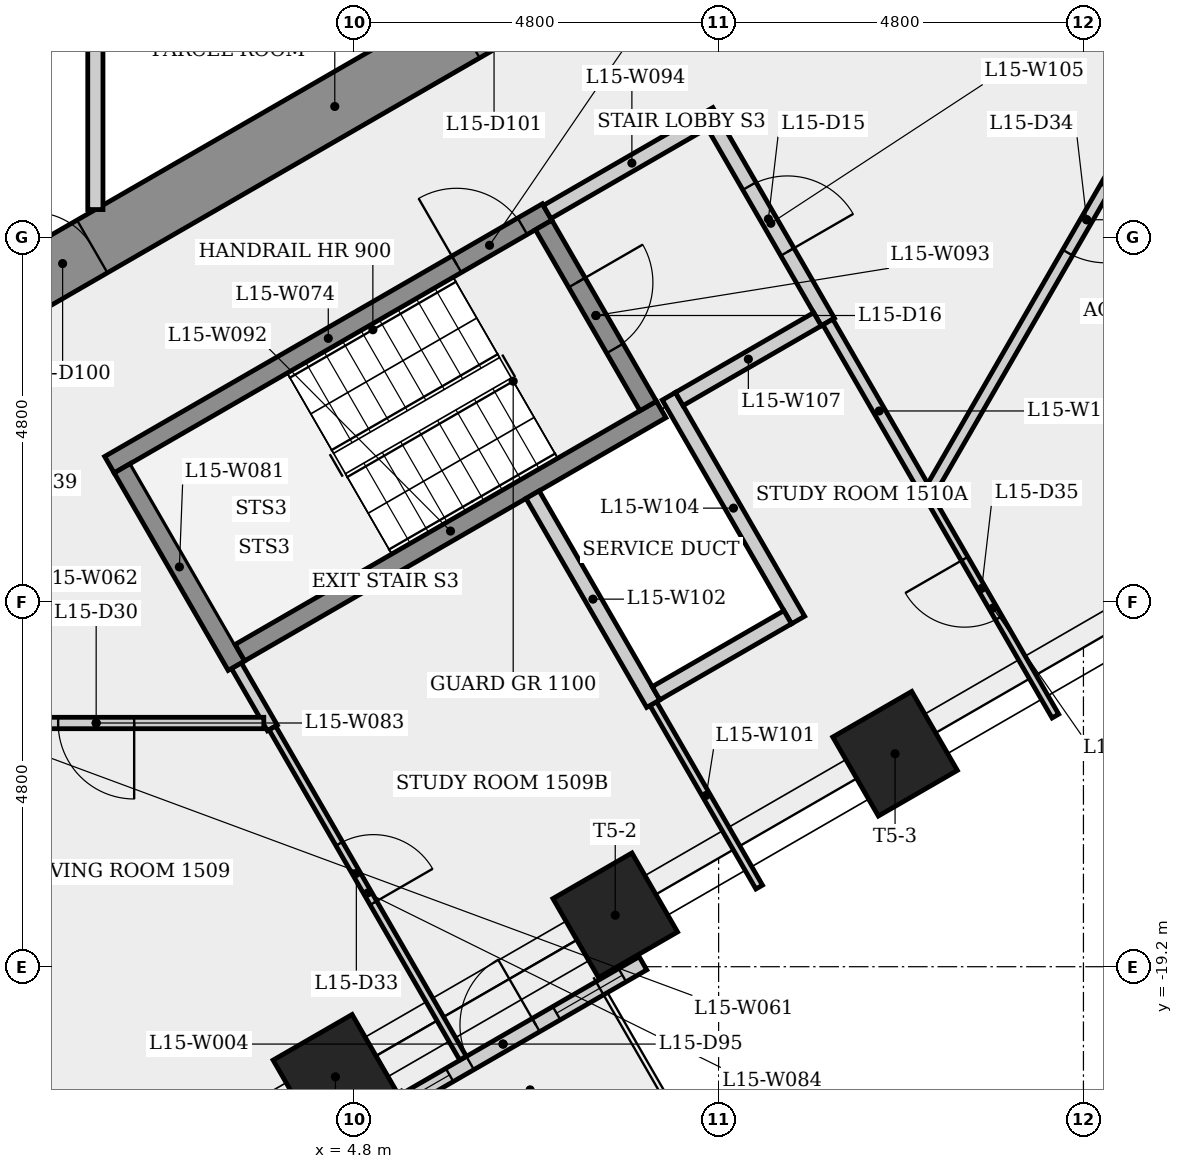
"""IFC4 building model, lengths in metres.
Left out: names, types, materials, properties, quantities, classifications, styles, units other than length and angle.
Written with IfcOpenShell. Run it as: python <this file> out.ifc"""

import sys

from ifc_helpers import new_model, si_unit, direction, frame, frame_2d, origin, origin_2d, place, context, subcontext, project, spatial, rectangle, extrude, element, fill, save


model = new_model("IFC4")
c1 = context("Model", 3, precision=1e-05, world=origin(), true_north=direction((0.0, 1.0)))
c2 = subcontext(c1, "Body", "Model", "MODEL_VIEW")
j1 = project(units=[si_unit("LENGTHUNIT", "METRE"), si_unit("PLANEANGLEUNIT", "RADIAN")], contexts=[c1])
p1 = place(None, origin())
s1 = spatial("IfcSite", under=j1, at=p1, CompositionType="ELEMENT")
p2 = place(p1, origin())
s2 = spatial("IfcBuilding", under=s1, at=p2, CompositionType="ELEMENT")
p3 = place(p2, frame((0.0, 0.0, 59.5)))
s3 = spatial("IfcBuildingStorey", under=s2, at=p3, CompositionType="ELEMENT", Elevation=59.5)
p4 = place(p3, frame((-0.2, -10.623, 0.0), z_axis=(0.0, 0.0, 1.0), x_axis=(0.866023993627, 0.500002442456, 0.0)))
e1 = element("IfcWall", 1, at=p4, inside=s3, PredefinedType="SHEAR", context=c2, shape_type="SweptSolid", body=[
    extrude(rectangle(XDim=10.97, YDim=0.8, at=frame_2d((5.485, 0.0))), origin(), (0.0, 0.0, 1.0), 3.4),
])
p5 = place(p4, frame((0.9, 0.0, 0.0)))
e2 = element("IfcOpeningElement", 2, at=p5, cuts=e1, PredefinedType="OPENING", context=c2, shape_type="SweptSolid", body=[
    extrude(rectangle(XDim=0.9, YDim=2.1, at=frame_2d((0.45, 1.05))), frame((0.0, 0.41, 0.0), z_axis=(0.0, -1.0, 0.0), x_axis=(1.0, 0.0, 0.0)), (0.0, 0.0, 1.0), 0.82),
])
p6 = place(p4, frame((7.455, 0.0, 0.0)))
e3 = element("IfcOpeningElement", 3, at=p6, cuts=e1, PredefinedType="OPENING", context=c2, shape_type="SweptSolid", body=[
    extrude(rectangle(XDim=0.9, YDim=2.1, at=frame_2d((0.45, 1.05))), frame((0.0, 0.41, 0.0), z_axis=(0.0, -1.0, 0.0), x_axis=(1.0, 0.0, 0.0)), (0.0, 0.0, 1.0), 0.82),
])
for number, where, z_axis, x_axis in (
    (4, (4.558, -20.649, 0.0), (0.0, 0.0, 1.0), (0.5, -0.866, 0.0)),
    (5, (8.24, -18.523, 0.0), (0.0, 0.0, 1.0), (0.5, -0.866, 0.0)),
    (6, (11.921, -16.397, 0.0), (0.0, 0.0, 1.0), (0.5, -0.866, 0.0)),
):
    element("IfcColumn", number, at=place(p3, frame(where, z_axis=z_axis, x_axis=x_axis)), inside=s3, PredefinedType="COLUMN", context=c2, shape_type="SweptSolid", body=[
        extrude(rectangle(XDim=1.2, YDim=1.2, at=origin_2d()), origin(), (0.0, 0.0, 1.0), 3.4),
    ])
p7 = place(p3, frame((4.923, -21.281, 0.0), z_axis=(0.0, 0.0, 1.0), x_axis=(0.866036396571, 0.499980959452, 0.0)))
e7 = element("IfcWall", 7, at=p7, inside=s3, PredefinedType="SOLIDWALL", context=c2, shape_type="SweptSolid", body=[
    extrude(rectangle(XDim=4.251, YDim=0.2, at=frame_2d((2.125, 0.0))), origin(), (0.0, 0.0, 1.0), 3.4),
])
p8 = place(p7, frame((1.625, 0.0, 0.0)))
e8 = element("IfcOpeningElement", 8, at=p8, cuts=e7, PredefinedType="OPENING", context=c2, shape_type="SweptSolid", body=[
    extrude(rectangle(XDim=1.0, YDim=2.4, at=frame_2d((0.5, 1.2))), frame((0.0, 0.11, 0.0), z_axis=(0.0, -1.0, 0.0), x_axis=(1.0, 0.0, 0.0)), (0.0, 0.0, 1.0), 0.22),
])
p9 = place(p7, frame((0.313, 0.0, 0.9)))
e9 = element("IfcOpeningElement", 9, at=p9, cuts=e7, PredefinedType="OPENING", context=c2, shape_type="SweptSolid", body=[
    extrude(rectangle(XDim=1.0, YDim=1.5, at=frame_2d((0.5, 0.75))), frame((0.0, 0.11, 0.0), z_axis=(0.0, -1.0, 0.0), x_axis=(1.0, 0.0, 0.0)), (0.0, 0.0, 1.0), 0.22),
])
p10 = place(p7, frame((2.938, 0.0, 0.9)))
e10 = element("IfcOpeningElement", 10, at=p10, cuts=e7, PredefinedType="OPENING", context=c2, shape_type="SweptSolid", body=[
    extrude(rectangle(XDim=1.0, YDim=1.5, at=frame_2d((0.5, 0.75))), frame((0.0, 0.11, 0.0), z_axis=(0.0, -1.0, 0.0), x_axis=(1.0, 0.0, 0.0)), (0.0, 0.0, 1.0), 0.22),
])
p11 = place(p3, frame((1.4, -5.275, 0.0), z_axis=(0.0, 0.0, 1.0), x_axis=(0.0, -1.0, 0.0)))
e11 = element("IfcWall", 11, at=p11, inside=s3, PredefinedType="PARTITIONING", context=c2, shape_type="SweptSolid", body=[
    extrude(rectangle(XDim=3.963, YDim=0.2, at=frame_2d((1.981, 0.0))), origin(), (0.0, 0.0, 1.0), 3.05),
])
p12 = place(p3, frame((1.585, -12.595, 0.0), z_axis=(0.0, 0.0, 1.0), x_axis=(0.866036417653, 0.499980922934, 0.0)))
e12 = element("IfcWall", 12, at=p12, inside=s3, PredefinedType="SHEAR", context=c2, shape_type="SweptSolid", body=[
    extrude(rectangle(XDim=6.65, YDim=0.25, at=frame_2d((3.325, 0.0))), origin(), (0.0, 0.0, 1.0), 3.05),
])
p13 = place(p12, frame((5.275, 0.0, 0.0)))
e13 = element("IfcOpeningElement", 13, at=p13, cuts=e12, PredefinedType="OPENING", context=c2, shape_type="SweptSolid", body=[
    extrude(rectangle(XDim=1.0, YDim=2.1, at=frame_2d((0.5, 1.05))), frame((0.0, 0.135, 0.0), z_axis=(0.0, -1.0, 0.0), x_axis=(1.0, 0.0, 0.0)), (0.0, 0.0, 1.0), 0.27),
])
p14 = place(p3, frame((3.256, -15.239, 0.0), z_axis=(0.0, 0.0, 1.0), x_axis=(0.499886281871, -0.866091049023, 0.0)))
e14 = element("IfcWall", 14, at=p14, inside=s3, PredefinedType="PARTITIONING", context=c2, shape_type="SweptSolid", body=[
    extrude(rectangle(XDim=0.946, YDim=0.15, at=frame_2d((0.473, 0.0))), origin(), (0.0, 0.0, 1.0), 3.05),
])
p15 = place(p3, frame((3.256, -15.239, 0.0), z_axis=(0.0, 0.0, 1.0), x_axis=(-0.50002537861, 0.866010750942, 0.0)))
e15 = element("IfcWall", 15, at=p15, inside=s3, PredefinedType="SHEAR", context=c2, shape_type="SweptSolid", body=[
    extrude(rectangle(XDim=3.0, YDim=0.25, at=frame_2d((1.5, 0.0))), origin(), (0.0, 0.0, 1.0), 3.05),
])
p16 = place(p3, frame((3.616, -15.993, 0.0), z_axis=(0.0, 0.0, 1.0), x_axis=(-1.0, 0.0, 0.0)))
e16 = element("IfcWall", 16, at=p16, inside=s3, PredefinedType="PARTITIONING", context=c2, shape_type="SweptSolid", body=[
    extrude(rectangle(XDim=4.411, YDim=0.15, at=frame_2d((2.206, 0.0))), origin(), (0.0, 0.0, 1.0), 3.05),
])
p17 = place(p16, frame((1.706, 0.0, 0.0)))
e17 = element("IfcOpeningElement", 17, at=p17, cuts=e16, PredefinedType="OPENING", context=c2, shape_type="SweptSolid", body=[
    extrude(rectangle(XDim=1.0, YDim=2.1, at=frame_2d((0.5, 1.05))), frame((0.0, 0.085, 0.0), z_axis=(0.0, -1.0, 0.0), x_axis=(1.0, 0.0, 0.0)), (0.0, 0.0, 1.0), 0.17),
])
p18 = place(p3, frame((3.729, -16.058, 0.0), z_axis=(0.0, 0.0, 1.0), x_axis=(0.50000754391, -0.866021048262, 0.0)))
e18 = element("IfcWall", 18, at=p18, inside=s3, PredefinedType="PARTITIONING", context=c2, shape_type="SweptSolid", body=[
    extrude(rectangle(XDim=5.016, YDim=0.1, at=frame_2d((2.508, 0.0))), origin(), (0.0, 0.0, 1.0), 3.05),
])
p19 = place(p18, frame((1.76, 0.0, 0.0)))
e19 = element("IfcOpeningElement", 19, at=p19, cuts=e18, PredefinedType="OPENING", context=c2, shape_type="SweptSolid", body=[
    extrude(rectangle(XDim=0.9, YDim=2.1, at=frame_2d((0.45, 1.05))), frame((0.0, 0.06, 0.0), z_axis=(0.0, -1.0, 0.0), x_axis=(1.0, 0.0, 0.0)), (0.0, 0.0, 1.0), 0.12),
])
p20 = place(p3, frame((3.301, -15.068, 0.0), z_axis=(0.0, 0.0, 1.0), x_axis=(0.866035036182, 0.499983315828, 0.0)))
e20 = element("IfcWall", 20, at=p20, inside=s3, PredefinedType="SHEAR", context=c2, shape_type="SweptSolid", body=[
    extrude(rectangle(XDim=6.4, YDim=0.25, at=frame_2d((3.2, 0.0))), origin(), (0.0, 0.0, 1.0), 3.05),
])
p21 = place(p3, frame((7.298, -9.441, 0.0), z_axis=(0.0, 0.0, 1.0), x_axis=(0.500034990121, -0.866005201286, 0.0)))
e21 = element("IfcWall", 21, at=p21, inside=s3, PredefinedType="SHEAR", context=c2, shape_type="SweptSolid", body=[
    extrude(rectangle(XDim=2.75, YDim=0.25, at=frame_2d((1.375, 0.0))), origin(), (0.0, 0.0, 1.0), 3.05),
])
p22 = place(p21, frame((0.875, 0.0, 0.0)))
e22 = element("IfcOpeningElement", 22, at=p22, cuts=e21, PredefinedType="OPENING", context=c2, shape_type="SweptSolid", body=[
    extrude(rectangle(XDim=1.0, YDim=2.1, at=frame_2d((0.5, 1.05))), frame((0.0, 0.135, 0.0), z_axis=(0.0, -1.0, 0.0), x_axis=(1.0, 0.0, 0.0)), (0.0, 0.0, 1.0), 0.27),
])
p23 = place(p3, frame((7.344, -9.27, 0.0), z_axis=(0.0, 0.0, 1.0), x_axis=(0.866005588531, 0.500034319456, 0.0)))
e23 = element("IfcWall", 23, at=p23, inside=s3, PredefinedType="PARTITIONING", context=c2, shape_type="SweptSolid", body=[
    extrude(rectangle(XDim=2.575, YDim=0.2, at=frame_2d((1.288, 0.0))), origin(), (0.0, 0.0, 1.0), 3.05),
])
p24 = place(p3, frame((8.74, -15.738, 0.0), z_axis=(0.0, 0.0, 1.0), x_axis=(0.500048472683, -0.865997416259, 0.0)))
e24 = element("IfcWall", 24, at=p24, inside=s3, PredefinedType="PARTITIONING", context=c2, shape_type="SweptSolid", body=[
    extrude(rectangle(XDim=2.787, YDim=0.1, at=frame_2d((1.394, 0.0))), origin(), (0.0, 0.0, 1.0), 3.05),
])
p25 = place(p3, frame((8.74, -15.739, 0.0), z_axis=(0.0, 0.0, 1.0), x_axis=(-0.500017526161, 0.866015284814, 0.0)))
e25 = element("IfcWall", 25, at=p25, inside=s3, PredefinedType="PLUMBINGWALL", context=c2, shape_type="SweptSolid", body=[
    extrude(rectangle(XDim=3.175, YDim=0.2, at=frame_2d((1.588, 0.0))), origin(), (0.0, 0.0, 1.0), 3.05),
])
p26 = place(p3, frame((8.945, -11.694, 0.0), z_axis=(0.0, 0.0, 1.0), x_axis=(0.500062241894, -0.865989465428, 0.0)))
e26 = element("IfcWall", 26, at=p26, inside=s3, PredefinedType="PLUMBINGWALL", context=c2, shape_type="SweptSolid", body=[
    extrude(rectangle(XDim=3.4, YDim=0.2, at=frame_2d((1.7, 0.0))), origin(), (0.0, 0.0, 1.0), 3.05),
])
p27 = place(p3, frame((9.537, -8.119, 0.0), z_axis=(0.0, 0.0, 1.0), x_axis=(0.499990139034, -0.866031096941, 0.0)))
e27 = element("IfcWall", 27, at=p27, inside=s3, PredefinedType="PARTITIONING", context=c2, shape_type="SweptSolid", body=[
    extrude(rectangle(XDim=3.0, YDim=0.2, at=frame_2d((1.5, 0.0))), origin(), (0.0, 0.0, 1.0), 3.05),
])
p28 = place(p27, frame((0.935, 0.0, 0.0)))
e28 = element("IfcOpeningElement", 28, at=p28, cuts=e27, PredefinedType="OPENING", context=c2, shape_type="SweptSolid", body=[
    extrude(rectangle(XDim=1.0, YDim=2.1, at=frame_2d((0.5, 1.05))), frame((0.0, 0.11, 0.0), z_axis=(0.0, -1.0, 0.0), x_axis=(1.0, 0.0, 0.0)), (0.0, 0.0, 1.0), 0.22),
])
p29 = place(p3, frame((10.509, -14.602, 0.0), z_axis=(0.0, 0.0, 1.0), x_axis=(-0.866010750942, -0.50002537861, 0.0)))
e29 = element("IfcWall", 29, at=p29, inside=s3, PredefinedType="PLUMBINGWALL", context=c2, shape_type="SweptSolid", body=[
    extrude(rectangle(XDim=2.0, YDim=0.2, at=frame_2d((1.0, 0.0))), origin(), (0.0, 0.0, 1.0), 3.05),
])
p30 = place(p3, frame((10.901, -10.681, 0.0), z_axis=(0.0, 0.0, 1.0), x_axis=(-0.866009402589, -0.500027713859, 0.0)))
e30 = element("IfcWall", 30, at=p30, inside=s3, PredefinedType="PARTITIONING", context=c2, shape_type="SweptSolid", body=[
    extrude(rectangle(XDim=2.1, YDim=0.2, at=frame_2d((1.05, 0.0))), origin(), (0.0, 0.0, 1.0), 3.05),
])
p31 = place(p3, frame((12.389, -13.058, 0.0), z_axis=(0.0, 0.0, 1.0), x_axis=(-0.499985657998, 0.866033683985, 0.0)))
e31 = element("IfcWall", 31, at=p31, inside=s3, PredefinedType="PARTITIONING", context=c2, shape_type="SweptSolid", body=[
    extrude(rectangle(XDim=2.703, YDim=0.15, at=frame_2d((1.352, 0.0))), origin(), (0.0, 0.0, 1.0), 3.05),
])
p32 = place(p3, frame((14.031, -15.902, 0.0), z_axis=(0.0, 0.0, 1.0), x_axis=(-0.500024907045, 0.866011023218, 0.0)))
e32 = element("IfcWall", 32, at=p32, inside=s3, PredefinedType="PARTITIONING", context=c2, shape_type="SweptSolid", body=[
    extrude(rectangle(XDim=3.284, YDim=0.1, at=frame_2d((1.642, 0.0))), origin(), (0.0, 0.0, 1.0), 3.05),
])
p33 = place(p32, frame((1.49, 0.0, 0.0)))
e33 = element("IfcOpeningElement", 33, at=p33, cuts=e32, PredefinedType="OPENING", context=c2, shape_type="SweptSolid", body=[
    extrude(rectangle(XDim=0.9, YDim=2.1, at=frame_2d((0.45, 1.05))), frame((0.0, 0.06, 0.0), z_axis=(0.0, -1.0, 0.0), x_axis=(1.0, 0.0, 0.0)), (0.0, 0.0, 1.0), 0.12),
])
p34 = place(p3, frame((16.496, -5.815, 0.0), z_axis=(0.0, 0.0, 1.0), x_axis=(-0.500016611795, -0.866015812748, 0.0)))
e34 = element("IfcWall", 34, at=p34, inside=s3, PredefinedType="PARTITIONING", context=c2, shape_type="SweptSolid", body=[
    extrude(rectangle(XDim=8.214, YDim=0.15, at=frame_2d((4.107, 0.0))), origin(), (0.0, 0.0, 1.0), 3.05),
])
p35 = place(p34, frame((3.607, 0.0, 0.0)))
e35 = element("IfcOpeningElement", 35, at=p35, cuts=e34, PredefinedType="OPENING", context=c2, shape_type="SweptSolid", body=[
    extrude(rectangle(XDim=1.0, YDim=2.1, at=frame_2d((0.5, 1.05))), frame((0.0, 0.085, 0.0), z_axis=(0.0, -1.0, 0.0), x_axis=(1.0, 0.0, 0.0)), (0.0, 0.0, 1.0), 0.17),
])
p36 = place(p8, origin())
e36 = element("IfcDoor", 36, at=p36, inside=s3, OperationType="SINGLE_SWING_RIGHT", PredefinedType="DOOR", context=c2, shape_type="SweptSolid", body=[
    extrude(rectangle(XDim=1.0, YDim=2.4, at=frame_2d((0.5, 1.2))), frame((0.0, 0.025, 0.0), z_axis=(0.0, -1.0, 0.0), x_axis=(1.0, 0.0, 0.0)), (0.0, 0.0, 1.0), 0.05),
])
fill(e8, e36)
p37 = place(p9, origin())
e37 = element("IfcWindow", 37, at=p37, inside=s3, PartitioningType="SINGLE_PANEL", PredefinedType="WINDOW", context=c2, shape_type="SweptSolid", body=[
    extrude(rectangle(XDim=1.0, YDim=1.5, at=frame_2d((0.5, 0.75))), frame((0.0, 0.03, 0.0), z_axis=(0.0, -1.0, 0.0), x_axis=(1.0, 0.0, 0.0)), (0.0, 0.0, 1.0), 0.06),
])
fill(e9, e37)
p38 = place(p10, origin())
e38 = element("IfcWindow", 38, at=p38, inside=s3, PartitioningType="SINGLE_PANEL", PredefinedType="WINDOW", context=c2, shape_type="SweptSolid", body=[
    extrude(rectangle(XDim=1.0, YDim=1.5, at=frame_2d((0.5, 0.75))), frame((0.0, 0.03, 0.0), z_axis=(0.0, -1.0, 0.0), x_axis=(1.0, 0.0, 0.0)), (0.0, 0.0, 1.0), 0.06),
])
fill(e10, e38)
p39 = place(p13, origin())
e39 = element("IfcDoor", 39, at=p39, inside=s3, OperationType="SINGLE_SWING_LEFT", PredefinedType="DOOR", context=c2, shape_type="SweptSolid", body=[
    extrude(rectangle(XDim=1.0, YDim=2.1, at=frame_2d((0.5, 1.05))), frame((0.0, 0.025, 0.0), z_axis=(0.0, -1.0, 0.0), x_axis=(1.0, 0.0, 0.0)), (0.0, 0.0, 1.0), 0.05),
])
fill(e13, e39)
p40 = place(p28, origin())
e40 = element("IfcDoor", 40, at=p40, inside=s3, OperationType="SINGLE_SWING_RIGHT", PredefinedType="DOOR", context=c2, shape_type="SweptSolid", body=[
    extrude(rectangle(XDim=1.0, YDim=2.1, at=frame_2d((0.5, 1.05))), frame((0.0, 0.025, 0.0), z_axis=(0.0, -1.0, 0.0), x_axis=(1.0, 0.0, 0.0)), (0.0, 0.0, 1.0), 0.05),
])
fill(e28, e40)
p41 = place(p22, origin())
e41 = element("IfcDoor", 41, at=p41, inside=s3, OperationType="SINGLE_SWING_LEFT", PredefinedType="DOOR", context=c2, shape_type="SweptSolid", body=[
    extrude(rectangle(XDim=1.0, YDim=2.1, at=frame_2d((0.5, 1.05))), frame((0.0, 0.025, 0.0), z_axis=(0.0, -1.0, 0.0), x_axis=(1.0, 0.0, 0.0)), (0.0, 0.0, 1.0), 0.05),
])
fill(e22, e41)
p42 = place(p17, origin())
e42 = element("IfcDoor", 42, at=p42, inside=s3, OperationType="SINGLE_SWING_LEFT", PredefinedType="DOOR", context=c2, shape_type="SweptSolid", body=[
    extrude(rectangle(XDim=1.0, YDim=2.1, at=frame_2d((0.5, 1.05))), frame((0.0, 0.025, 0.0), z_axis=(0.0, -1.0, 0.0), x_axis=(1.0, 0.0, 0.0)), (0.0, 0.0, 1.0), 0.05),
])
fill(e17, e42)
p43 = place(p19, origin())
e43 = element("IfcDoor", 43, at=p43, inside=s3, OperationType="SINGLE_SWING_RIGHT", PredefinedType="DOOR", context=c2, shape_type="SweptSolid", body=[
    extrude(rectangle(XDim=0.9, YDim=2.1, at=frame_2d((0.45, 1.05))), frame((0.0, 0.025, 0.0), z_axis=(0.0, -1.0, 0.0), x_axis=(1.0, 0.0, 0.0)), (0.0, 0.0, 1.0), 0.05),
])
fill(e19, e43)
p44 = place(p35, origin())
e44 = element("IfcDoor", 44, at=p44, inside=s3, OperationType="SINGLE_SWING_LEFT", PredefinedType="DOOR", context=c2, shape_type="SweptSolid", body=[
    extrude(rectangle(XDim=1.0, YDim=2.1, at=frame_2d((0.5, 1.05))), frame((0.0, 0.025, 0.0), z_axis=(0.0, -1.0, 0.0), x_axis=(1.0, 0.0, 0.0)), (0.0, 0.0, 1.0), 0.05),
])
fill(e35, e44)
p45 = place(p33, origin())
e45 = element("IfcDoor", 45, at=p45, inside=s3, OperationType="SINGLE_SWING_RIGHT", PredefinedType="DOOR", context=c2, shape_type="SweptSolid", body=[
    extrude(rectangle(XDim=0.9, YDim=2.1, at=frame_2d((0.45, 1.05))), frame((0.0, 0.025, 0.0), z_axis=(0.0, -1.0, 0.0), x_axis=(1.0, 0.0, 0.0)), (0.0, 0.0, 1.0), 0.05),
])
fill(e33, e45)
p46 = place(p5, origin())
e46 = element("IfcDoor", 46, at=p46, inside=s3, OperationType="SINGLE_SWING_LEFT", PredefinedType="DOOR", context=c2, shape_type="SweptSolid", body=[
    extrude(rectangle(XDim=0.9, YDim=2.1, at=frame_2d((0.45, 1.05))), frame((0.0, 0.025, 0.0), z_axis=(0.0, -1.0, 0.0), x_axis=(1.0, 0.0, 0.0)), (0.0, 0.0, 1.0), 0.05),
])
fill(e2, e46)
save(model, sys.argv[1])
